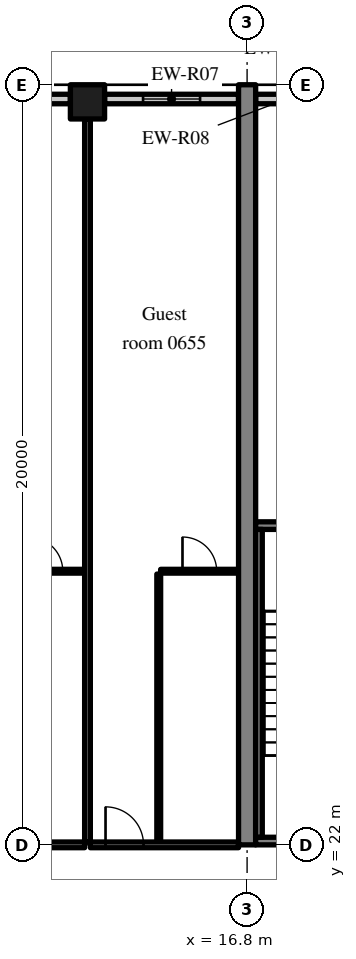
"""IFC4 building model, lengths in metres.
Left out: names, types, materials, properties, quantities, classifications, styles, units other than length and angle.
Written with IfcOpenShell. Run it as: python <this file> out.ifc"""

import sys

from ifc_helpers import new_model, si_unit, direction, frame, frame_2d, origin, origin_2d, place, context, subcontext, project, spatial, rectangle, extrude, source, transform, mapped, element, fill, save


model = new_model("IFC4")
c1 = context("Model", 3, precision=1e-05, world=origin(), true_north=direction((0.0, 1.0)))
c2 = subcontext(c1, "Body", "Model", "MODEL_VIEW")
j1 = project(units=[si_unit("LENGTHUNIT", "METRE"), si_unit("PLANEANGLEUNIT", "RADIAN")], contexts=[c1])
p1 = place(None, origin())
s1 = spatial("IfcSite", under=j1, at=p1, CompositionType="ELEMENT")
p2 = place(p1, origin())
s2 = spatial("IfcBuilding", under=s1, at=p2, CompositionType="ELEMENT")
p3 = place(p2, frame((0.0, 0.0, 31.6)))
s3 = spatial("IfcBuildingStorey", under=s2, at=p3, CompositionType="ELEMENT", Elevation=31.6)
m1 = source(origin(), c2, "Body", "SweptSolid", [
    extrude(rectangle(XDim=20.0, YDim=0.45, at=frame_2d((10.0, 0.0))), origin(), (0.0, 0.0, 1.0), 3.52),
])
p4 = place(p3, frame((16.8, 22.0, 0.0), z_axis=(0.0, 0.0, 1.0), x_axis=(0.0, 1.0, 0.0)))
e1 = element("IfcWall", 1, at=p4, inside=s3, PredefinedType="SHEAR", context=c2, shape_type="MappedRepresentation", body=[
    mapped(m1, transform((0.0, 0.0, 0.0), scale=1.0)),
])
m2 = source(origin(), c2, "Body", "SweptSolid", [
    extrude(rectangle(XDim=0.9, YDim=0.9, at=origin_2d()), origin(), (0.0, 0.0, 1.0), 3.52),
])
p5 = place(p3, frame((12.6, 41.55, 0.0), z_axis=(0.0, 0.0, 1.0), x_axis=(1.0, 0.0, 0.0)))
e2 = element("IfcColumn", 2, at=p5, inside=s3, PredefinedType="COLUMN", context=c2, shape_type="MappedRepresentation", body=[
    mapped(m2, transform((0.0, 0.0, 0.0), scale=1.0)),
])
m3 = source(origin(), c2, "Body", "SweptSolid", [
    extrude(rectangle(XDim=3.525, YDim=0.25, at=frame_2d((1.762, 0.0))), origin(), (0.0, 0.0, 1.0), 2.77),
])
p6 = place(p3, frame((12.15, 41.625, 0.0), z_axis=(0.0, 0.0, 1.0), x_axis=(-1.0, 0.0, 0.0)))
e3 = element("IfcWall", 3, at=p6, inside=s3, PredefinedType="SOLIDWALL", context=c2, shape_type="MappedRepresentation", body=[
    mapped(m3, transform((0.0, 0.0, 0.0), scale=1.0)),
])
m4 = source(origin(), c2, "Body", "SweptSolid", [
    extrude(rectangle(XDim=1.5, YDim=1.5, at=frame_2d((0.75, 0.75))), frame((0.0, 0.135, 0.0), z_axis=(0.0, -1.0, 0.0), x_axis=(1.0, 0.0, 0.0)), (0.0, 0.0, 1.0), 0.27),
])
p7 = place(p6, frame((1.012, 0.0, 0.9)))
e4 = element("IfcOpeningElement", 4, at=p7, cuts=e3, PredefinedType="OPENING", context=c2, shape_type="MappedRepresentation", body=[
    mapped(m4, transform((0.0, 0.0, 0.0), scale=1.0)),
])
p8 = place(p3, frame((16.575, 41.625, 0.0), z_axis=(0.0, 0.0, 1.0), x_axis=(-1.0, 0.0, 0.0)))
e5 = element("IfcWall", 5, at=p8, inside=s3, PredefinedType="SOLIDWALL", context=c2, shape_type="MappedRepresentation", body=[
    mapped(m3, transform((0.0, 0.0, 0.0), scale=1.0)),
])
p9 = place(p8, frame((1.012, 0.0, 0.9)))
e6 = element("IfcOpeningElement", 6, at=p9, cuts=e5, PredefinedType="OPENING", context=c2, shape_type="MappedRepresentation", body=[
    mapped(m4, transform((0.0, 0.0, 0.0), scale=1.0)),
])
m5 = source(origin(), c2, "Body", "SweptSolid", [
    extrude(rectangle(XDim=1.633, YDim=0.25, at=frame_2d((0.816, 0.0))), origin(), (0.0, 0.0, 1.0), 2.77),
])
p10 = place(p3, frame((18.658, 41.625, 0.0), z_axis=(0.0, 0.0, 1.0), x_axis=(-1.0, 0.0, 0.0)))
e7 = element("IfcWall", 7, at=p10, inside=s3, PredefinedType="SOLIDWALL", context=c2, shape_type="MappedRepresentation", body=[
    mapped(m5, transform((0.0, 0.0, 0.0), scale=1.0)),
])
m6 = source(origin(), c2, "Body", "SweptSolid", [
    extrude(rectangle(XDim=8.175, YDim=0.2, at=frame_2d((4.087, 0.0))), origin(), (0.0, 0.0, 1.0), 3.52),
])
p11 = place(p3, frame((17.025, 22.1, 0.0), z_axis=(0.0, 0.0, 1.0), x_axis=(1.0, 0.0, 0.0)))
e8 = element("IfcWall", 8, at=p11, inside=s3, PredefinedType="SOLIDWALL", context=c2, shape_type="MappedRepresentation", body=[
    mapped(m6, transform((0.0, 0.0, 0.0), scale=1.0)),
])
m7 = source(origin(), c2, "Body", "SweptSolid", [
    extrude(rectangle(XDim=1.2, YDim=2.1, at=frame_2d((0.6, 1.05))), frame((0.0, 0.11, 0.0), z_axis=(0.0, -1.0, 0.0), x_axis=(1.0, 0.0, 0.0)), (0.0, 0.0, 1.0), 0.22),
])
p12 = place(p11, frame((5.975, 0.0, 0.0)))
e9 = element("IfcOpeningElement", 9, at=p12, cuts=e8, PredefinedType="OPENING", context=c2, shape_type="MappedRepresentation", body=[
    mapped(m7, transform((0.0, 0.0, 0.0), scale=1.0)),
])
p13 = place(p3, frame((17.025, 30.4, 0.0), z_axis=(0.0, 0.0, 1.0), x_axis=(1.0, 0.0, 0.0)))
e10 = element("IfcWall", 10, at=p13, inside=s3, PredefinedType="SOLIDWALL", context=c2, shape_type="MappedRepresentation", body=[
    mapped(m6, transform((0.0, 0.0, 0.0), scale=1.0)),
])
m8 = source(origin(), c2, "Body", "SweptSolid", [
    extrude(rectangle(XDim=1.0, YDim=2.1, at=frame_2d((0.5, 1.05))), frame((0.0, 0.11, 0.0), z_axis=(0.0, -1.0, 0.0), x_axis=(1.0, 0.0, 0.0)), (0.0, 0.0, 1.0), 0.22),
])
p14 = place(p13, frame((6.075, 0.0, 0.0)))
e11 = element("IfcOpeningElement", 11, at=p14, cuts=e10, PredefinedType="OPENING", context=c2, shape_type="MappedRepresentation", body=[
    mapped(m8, transform((0.0, 0.0, 0.0), scale=1.0)),
])
m9 = source(origin(), c2, "Body", "SweptSolid", [
    extrude(rectangle(XDim=8.1, YDim=0.175, at=frame_2d((4.05, 0.0))), origin(), (0.0, 0.0, 1.0), 3.52),
])
p15 = place(p3, frame((17.112, 22.2, 0.0), z_axis=(0.0, 0.0, 1.0), x_axis=(0.0, 1.0, 0.0)))
e12 = element("IfcWall", 12, at=p15, inside=s3, PredefinedType="SOLIDWALL", context=c2, shape_type="MappedRepresentation", body=[
    mapped(m9, transform((0.0, 0.0, 0.0), scale=1.0)),
])
m10 = source(origin(), c2, "Body", "SweptSolid", [
    extrude(rectangle(XDim=2.05, YDim=0.1, at=frame_2d((1.025, 0.0))), origin(), (0.0, 0.0, 1.0), 3.52),
])
p16 = place(p3, frame((10.475, 29.2, 0.0), z_axis=(0.0, 0.0, 1.0), x_axis=(1.0, 0.0, 0.0)))
e13 = element("IfcWall", 13, at=p16, inside=s3, PredefinedType="PARTITIONING", context=c2, shape_type="MappedRepresentation", body=[
    mapped(m10, transform((0.0, 0.0, 0.0), scale=1.0)),
])
m11 = source(origin(), c2, "Body", "SweptSolid", [
    extrude(rectangle(XDim=0.9, YDim=2.1, at=frame_2d((0.45, 1.05))), frame((0.0, 0.06, 0.0), z_axis=(0.0, -1.0, 0.0), x_axis=(1.0, 0.0, 0.0)), (0.0, 0.0, 1.0), 0.12),
])
p17 = place(p16, frame((0.575, 0.0, 0.0)))
e14 = element("IfcOpeningElement", 14, at=p17, cuts=e13, PredefinedType="OPENING", context=c2, shape_type="MappedRepresentation", body=[
    mapped(m11, transform((0.0, 0.0, 0.0), scale=1.0)),
])
m12 = source(origin(), c2, "Body", "SweptSolid", [
    extrude(rectangle(XDim=3.9, YDim=0.15, at=frame_2d((1.95, 0.0))), origin(), (0.0, 0.0, 1.0), 2.82),
])
p18 = place(p3, frame((8.625, 22.0, 0.0), z_axis=(0.0, 0.0, 1.0), x_axis=(1.0, 0.0, 0.0)))
e15 = element("IfcWall", 15, at=p18, inside=s3, PredefinedType="PARTITIONING", context=c2, shape_type="MappedRepresentation", body=[
    mapped(m12, transform((0.0, 0.0, 0.0), scale=1.0)),
])
m13 = source(origin(), c2, "Body", "SweptSolid", [
    extrude(rectangle(XDim=1.0, YDim=2.1, at=frame_2d((0.5, 1.05))), frame((0.0, 0.085, 0.0), z_axis=(0.0, -1.0, 0.0), x_axis=(1.0, 0.0, 0.0)), (0.0, 0.0, 1.0), 0.17),
])
p19 = place(p18, frame((0.4, 0.0, 0.0)))
e16 = element("IfcOpeningElement", 16, at=p19, cuts=e15, PredefinedType="OPENING", context=c2, shape_type="MappedRepresentation", body=[
    mapped(m13, transform((0.0, 0.0, 0.0), scale=1.0)),
])
m14 = source(origin(), c2, "Body", "SweptSolid", [
    extrude(rectangle(XDim=7.05, YDim=0.1, at=frame_2d((3.525, 0.0))), origin(), (0.0, 0.0, 1.0), 3.52),
])
p20 = place(p3, frame((14.475, 22.075, 0.0), z_axis=(0.0, 0.0, 1.0), x_axis=(0.0, 1.0, 0.0)))
e17 = element("IfcWall", 17, at=p20, inside=s3, PredefinedType="PARTITIONING", context=c2, shape_type="MappedRepresentation", body=[
    mapped(m14, transform((0.0, 0.0, 0.0), scale=1.0)),
])
m15 = source(origin(), c2, "Body", "SweptSolid", [
    extrude(rectangle(XDim=2.05, YDim=0.1, at=frame_2d((1.025, 0.0))), origin(), (0.0, 0.0, 1.0), 3.52),
])
p21 = place(p3, frame((14.525, 29.2, 0.0), z_axis=(0.0, 0.0, 1.0), x_axis=(1.0, 0.0, 0.0)))
e18 = element("IfcWall", 18, at=p21, inside=s3, PredefinedType="PARTITIONING", context=c2, shape_type="MappedRepresentation", body=[
    mapped(m15, transform((0.0, 0.0, 0.0), scale=1.0)),
])
p22 = place(p21, frame((0.575, 0.0, 0.0)))
e19 = element("IfcOpeningElement", 19, at=p22, cuts=e18, PredefinedType="OPENING", context=c2, shape_type="MappedRepresentation", body=[
    mapped(m11, transform((0.0, 0.0, 0.0), scale=1.0)),
])
p23 = place(p3, frame((12.675, 22.0, 0.0), z_axis=(0.0, 0.0, 1.0), x_axis=(1.0, 0.0, 0.0)))
e20 = element("IfcWall", 20, at=p23, inside=s3, PredefinedType="PARTITIONING", context=c2, shape_type="MappedRepresentation", body=[
    mapped(m12, transform((0.0, 0.0, 0.0), scale=1.0)),
])
p24 = place(p23, frame((0.4, 0.0, 0.0)))
e21 = element("IfcOpeningElement", 21, at=p24, cuts=e20, PredefinedType="OPENING", context=c2, shape_type="MappedRepresentation", body=[
    mapped(m13, transform((0.0, 0.0, 0.0), scale=1.0)),
])
m16 = source(origin(), c2, "Body", "SweptSolid", [
    extrude(rectangle(XDim=19.025, YDim=0.15, at=frame_2d((9.513, 0.0))), origin(), (0.0, 0.0, 1.0), 3.52),
])
p25 = place(p3, frame((12.6, 22.075, 0.0), z_axis=(0.0, 0.0, 1.0), x_axis=(0.0, 1.0, 0.0)))
e22 = element("IfcWall", 22, at=p25, inside=s3, PredefinedType="PARTITIONING", context=c2, shape_type="MappedRepresentation", body=[
    mapped(m16, transform((0.0, 0.0, 0.0), scale=1.0)),
])
m17 = source(origin(), c2, "Body", "SweptSolid", [
    extrude(rectangle(XDim=1.5, YDim=1.5, at=frame_2d((0.75, 0.75))), frame((0.0, 0.03, 0.0), z_axis=(0.0, -1.0, 0.0), x_axis=(1.0, 0.0, 0.0)), (0.0, 0.0, 1.0), 0.06),
])
p26 = place(p9, origin())
e23 = element("IfcWindow", 23, at=p26, inside=s3, PartitioningType="SINGLE_PANEL", PredefinedType="WINDOW", context=c2, shape_type="MappedRepresentation", body=[
    mapped(m17, transform((0.0, 0.0, 0.0), scale=1.0)),
])
fill(e6, e23)
m18 = source(origin(), c2, "Body", "SweptSolid", [
    extrude(rectangle(XDim=0.9, YDim=2.1, at=frame_2d((0.45, 1.05))), frame((0.0, 0.025, 0.0), z_axis=(0.0, -1.0, 0.0), x_axis=(1.0, 0.0, 0.0)), (0.0, 0.0, 1.0), 0.05),
])
p27 = place(p17, origin())
e24 = element("IfcDoor", 24, at=p27, inside=s3, OperationType="SINGLE_SWING_LEFT", PredefinedType="DOOR", context=c2, shape_type="MappedRepresentation", body=[
    mapped(m18, transform((0.0, 0.0, 0.0), scale=1.0)),
])
fill(e14, e24)
p28 = place(p22, origin())
e25 = element("IfcDoor", 25, at=p28, inside=s3, OperationType="SINGLE_SWING_LEFT", PredefinedType="DOOR", context=c2, shape_type="MappedRepresentation", body=[
    mapped(m18, transform((0.0, 0.0, 0.0), scale=1.0)),
])
fill(e19, e25)
m19 = source(origin(), c2, "Body", "SweptSolid", [
    extrude(rectangle(XDim=1.0, YDim=2.1, at=frame_2d((0.5, 1.05))), frame((0.0, 0.025, 0.0), z_axis=(0.0, -1.0, 0.0), x_axis=(1.0, 0.0, 0.0)), (0.0, 0.0, 1.0), 0.05),
])
p29 = place(p24, origin())
e26 = element("IfcDoor", 26, at=p29, inside=s3, OperationType="SINGLE_SWING_LEFT", PredefinedType="DOOR", context=c2, shape_type="MappedRepresentation", body=[
    mapped(m19, transform((0.0, 0.0, 0.0), scale=1.0)),
])
fill(e21, e26)
save(model, sys.argv[1])
